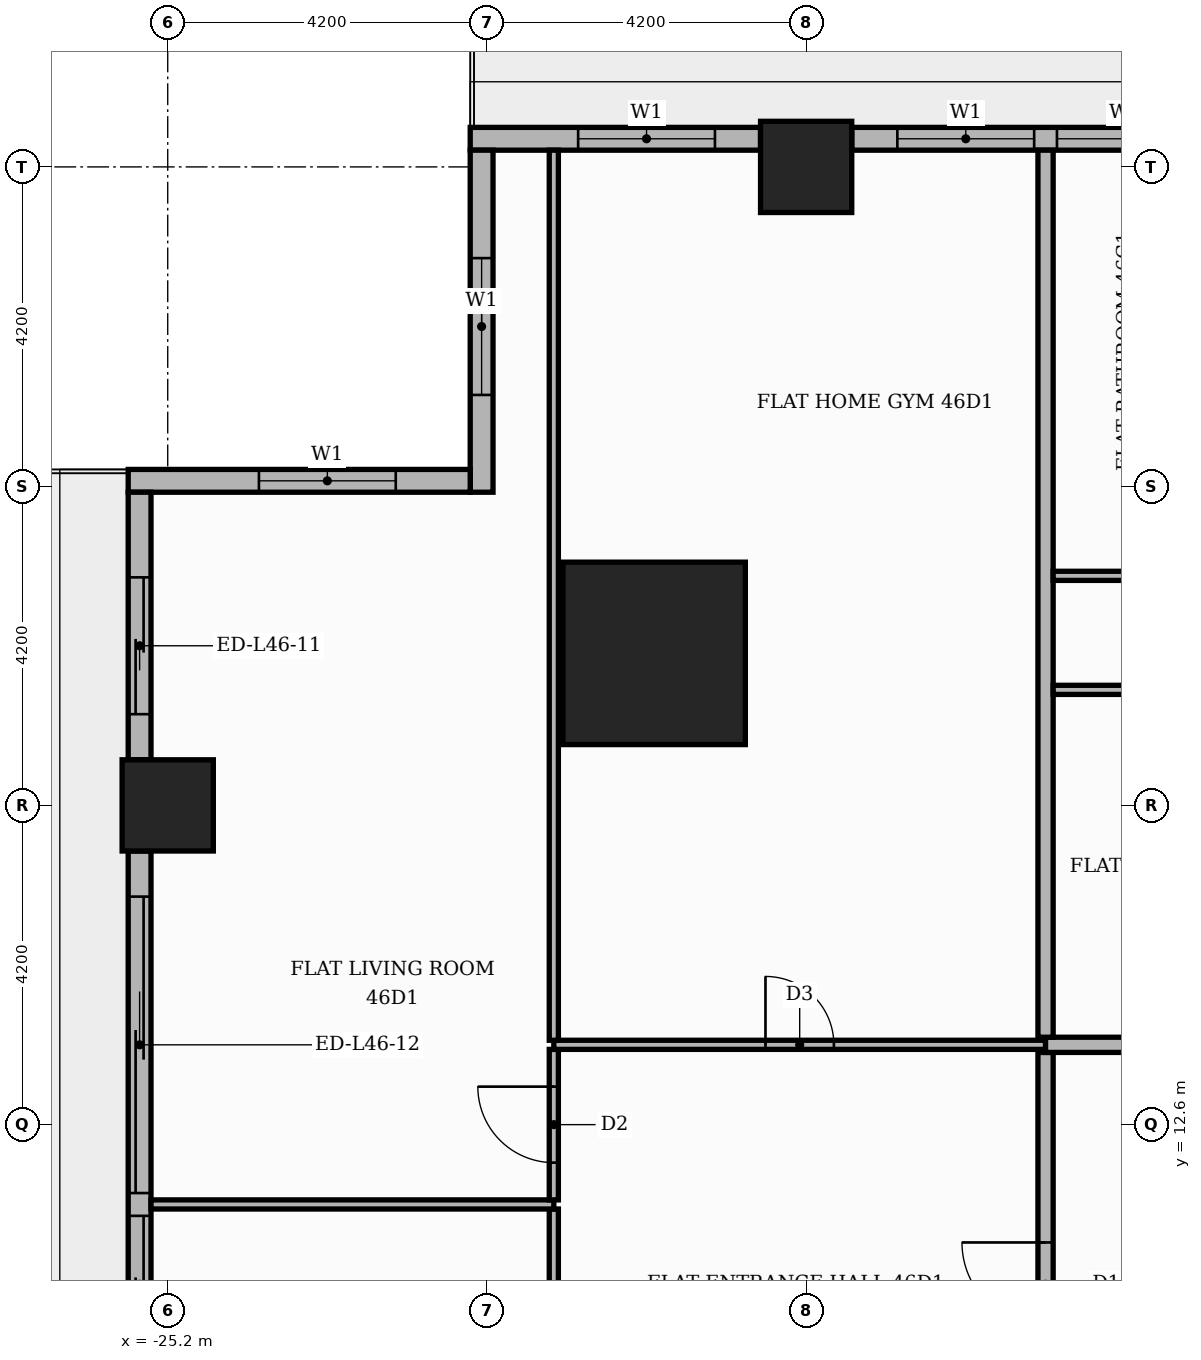
"""IFC4 building model, lengths in metres.
Left out: names, types, materials, properties, quantities, classifications, styles, units other than length and angle.
Written with IfcOpenShell. Run it as: python <this file> out.ifc"""

import sys

from ifc_helpers import new_model, si_unit, direction, frame, frame_2d, origin, origin_2d, place, context, subcontext, project, spatial, rectangle, extrude, element, fill, save


model = new_model("IFC4")
c1 = context("Model", 3, precision=1e-05, world=origin(), true_north=direction((0.0, 1.0)))
c2 = subcontext(c1, "Body", "Model", "MODEL_VIEW")
j1 = project(units=[si_unit("LENGTHUNIT", "METRE"), si_unit("PLANEANGLEUNIT", "RADIAN")], contexts=[c1])
p1 = place(None, origin())
s1 = spatial("IfcSite", under=j1, at=p1, CompositionType="ELEMENT")
p2 = place(p1, origin())
s2 = spatial("IfcBuilding", under=s1, at=p2, CompositionType="ELEMENT")
p3 = place(p2, frame((0.0, 0.0, 196.2)))
s3 = spatial("IfcBuildingStorey", under=s2, at=p3, CompositionType="ELEMENT", Elevation=196.2)
p4 = place(p3, frame((-18.8, 18.8, 0.0), z_axis=(0.0, 0.0, 1.0), x_axis=(1.0, 0.0, 0.0)))
e1 = element("IfcColumn", 1, at=p4, inside=s3, PredefinedType="COLUMN", context=c2, shape_type="SweptSolid", body=[
    extrude(rectangle(XDim=2.4, YDim=2.4, at=origin_2d()), origin(), (0.0, 0.0, 1.0), 3.9),
])
for number, where, z_axis, x_axis in (
    (2, (-16.8, 25.2, 0.0), (0.0, 0.0, 1.0), (1.0, 0.0, 0.0)),
    (3, (-25.2, 16.8, 0.0), (0.0, 0.0, 1.0), (1.0, 0.0, 0.0)),
):
    element("IfcColumn", number, at=place(p3, frame(where, z_axis=z_axis, x_axis=x_axis)), inside=s3, PredefinedType="COLUMN", context=c2, shape_type="SweptSolid", body=[
        extrude(rectangle(XDim=1.2, YDim=1.2, at=origin_2d()), origin(), (0.0, 0.0, 1.0), 3.9),
    ])
p5 = place(p3, frame((-9.0, 25.57, 0.0), z_axis=(0.0, 0.0, 1.0), x_axis=(-1.0, 0.0, 0.0)))
e4 = element("IfcWall", 4, at=p5, inside=s3, PredefinedType="STANDARD", context=c2, shape_type="SweptSolid", body=[
    extrude(rectangle(XDim=7.2, YDim=0.3, at=frame_2d((3.6, 0.0))), origin(), (0.0, 0.0, 1.0), 3.48),
])
p6 = place(p5, frame((0.6, 0.0, 0.9)))
e5 = element("IfcOpeningElement", 5, at=p6, cuts=e4, PredefinedType="OPENING", context=c2, shape_type="SweptSolid", body=[
    extrude(rectangle(XDim=1.8, YDim=2.1, at=frame_2d((0.9, 1.05))), frame((0.0, 0.16, 0.0), z_axis=(0.0, -1.0, 0.0), x_axis=(1.0, 0.0, 0.0)), (0.0, 0.0, 1.0), 0.32),
])
p7 = place(p5, frame((2.7, 0.0, 0.9)))
e6 = element("IfcOpeningElement", 6, at=p7, cuts=e4, PredefinedType="OPENING", context=c2, shape_type="SweptSolid", body=[
    extrude(rectangle(XDim=1.8, YDim=2.1, at=frame_2d((0.9, 1.05))), frame((0.0, 0.16, 0.0), z_axis=(0.0, -1.0, 0.0), x_axis=(1.0, 0.0, 0.0)), (0.0, 0.0, 1.0), 0.32),
])
p8 = place(p5, frame((4.8, 0.0, 0.9)))
e7 = element("IfcOpeningElement", 7, at=p8, cuts=e4, PredefinedType="OPENING", context=c2, shape_type="SweptSolid", body=[
    extrude(rectangle(XDim=1.8, YDim=2.1, at=frame_2d((0.9, 1.05))), frame((0.0, 0.16, 0.0), z_axis=(0.0, -1.0, 0.0), x_axis=(1.0, 0.0, 0.0)), (0.0, 0.0, 1.0), 0.32),
])
p9 = place(p3, frame((-17.4, 25.57, 0.0), z_axis=(0.0, 0.0, 1.0), x_axis=(-1.0, 0.0, 0.0)))
e8 = element("IfcWall", 8, at=p9, inside=s3, PredefinedType="STANDARD", context=c2, shape_type="SweptSolid", body=[
    extrude(rectangle(XDim=3.82, YDim=0.3, at=frame_2d((1.91, 0.0))), origin(), (0.0, 0.0, 1.0), 3.48),
])
p10 = place(p9, frame((0.6, 0.0, 0.9)))
e9 = element("IfcOpeningElement", 9, at=p10, cuts=e8, PredefinedType="OPENING", context=c2, shape_type="SweptSolid", body=[
    extrude(rectangle(XDim=1.8, YDim=2.1, at=frame_2d((0.9, 1.05))), frame((0.0, 0.16, 0.0), z_axis=(0.0, -1.0, 0.0), x_axis=(1.0, 0.0, 0.0)), (0.0, 0.0, 1.0), 0.32),
])
p11 = place(p3, frame((-21.07, 25.42, 0.0), z_axis=(0.0, 0.0, 1.0), x_axis=(0.0, -1.0, 0.0)))
e10 = element("IfcWall", 10, at=p11, inside=s3, PredefinedType="STANDARD", context=c2, shape_type="SweptSolid", body=[
    extrude(rectangle(XDim=4.5, YDim=0.3, at=frame_2d((2.25, 0.0))), origin(), (0.0, 0.0, 1.0), 3.48),
])
p12 = place(p11, frame((1.42, 0.0, 0.9)))
e11 = element("IfcOpeningElement", 11, at=p12, cuts=e10, PredefinedType="OPENING", context=c2, shape_type="SweptSolid", body=[
    extrude(rectangle(XDim=1.8, YDim=2.1, at=frame_2d((0.9, 1.05))), frame((0.0, 0.16, 0.0), z_axis=(0.0, -1.0, 0.0), x_axis=(1.0, 0.0, 0.0)), (0.0, 0.0, 1.0), 0.32),
])
p13 = place(p3, frame((-21.22, 21.07, 0.0), z_axis=(0.0, 0.0, 1.0), x_axis=(-1.0, 0.0, 0.0)))
e12 = element("IfcWall", 12, at=p13, inside=s3, PredefinedType="STANDARD", context=c2, shape_type="SweptSolid", body=[
    extrude(rectangle(XDim=4.5, YDim=0.3, at=frame_2d((2.25, 0.0))), origin(), (0.0, 0.0, 1.0), 3.48),
])
p14 = place(p13, frame((0.98, 0.0, 0.9)))
e13 = element("IfcOpeningElement", 13, at=p14, cuts=e12, PredefinedType="OPENING", context=c2, shape_type="SweptSolid", body=[
    extrude(rectangle(XDim=1.8, YDim=2.1, at=frame_2d((0.9, 1.05))), frame((0.0, 0.16, 0.0), z_axis=(0.0, -1.0, 0.0), x_axis=(1.0, 0.0, 0.0)), (0.0, 0.0, 1.0), 0.32),
])
p15 = place(p3, frame((-25.57, 20.92, 0.0), z_axis=(0.0, 0.0, 1.0), x_axis=(0.0, -1.0, 0.0)))
e14 = element("IfcWall", 14, at=p15, inside=s3, PredefinedType="STANDARD", context=c2, shape_type="SweptSolid", body=[
    extrude(rectangle(XDim=3.52, YDim=0.3, at=frame_2d((1.76, 0.0))), origin(), (0.0, 0.0, 1.0), 3.48),
])
p16 = place(p15, frame((1.12, 0.0, 0.0)))
e15 = element("IfcOpeningElement", 15, at=p16, cuts=e14, PredefinedType="OPENING", context=c2, shape_type="SweptSolid", body=[
    extrude(rectangle(XDim=1.8, YDim=2.4, at=frame_2d((0.9, 1.2))), frame((0.0, 0.16, 0.0), z_axis=(0.0, -1.0, 0.0), x_axis=(1.0, 0.0, 0.0)), (0.0, 0.0, 1.0), 0.32),
])
p17 = place(p3, frame((-25.57, 16.2, 0.0), z_axis=(0.0, 0.0, 1.0), x_axis=(0.0, -1.0, 0.0)))
e16 = element("IfcWall", 16, at=p17, inside=s3, PredefinedType="STANDARD", context=c2, shape_type="SweptSolid", body=[
    extrude(rectangle(XDim=7.2, YDim=0.3, at=frame_2d((3.6, 0.0))), origin(), (0.0, 0.0, 1.0), 3.48),
])
p18 = place(p17, frame((0.6, 0.0, 0.0)))
e17 = element("IfcOpeningElement", 17, at=p18, cuts=e16, PredefinedType="OPENING", context=c2, shape_type="SweptSolid", body=[
    extrude(rectangle(XDim=3.9, YDim=2.4, at=frame_2d((1.95, 1.2))), frame((0.0, 0.16, 0.0), z_axis=(0.0, -1.0, 0.0), x_axis=(1.0, 0.0, 0.0)), (0.0, 0.0, 1.0), 0.32),
])
p19 = place(p17, frame((4.8, 0.0, 0.0)))
e18 = element("IfcOpeningElement", 18, at=p19, cuts=e16, PredefinedType="OPENING", context=c2, shape_type="SweptSolid", body=[
    extrude(rectangle(XDim=1.8, YDim=2.4, at=frame_2d((0.9, 1.2))), frame((0.0, 0.16, 0.0), z_axis=(0.0, -1.0, 0.0), x_axis=(1.0, 0.0, 0.0)), (0.0, 0.0, 1.0), 0.32),
])
p20 = place(p3, frame((-13.65, -13.55, 0.0), z_axis=(0.0, 0.0, 1.0), x_axis=(0.0, 1.0, 0.0)))
e19 = element("IfcWall", 19, at=p20, inside=s3, PredefinedType="PARTITIONING", context=c2, shape_type="SweptSolid", body=[
    extrude(rectangle(XDim=27.1, YDim=0.2, at=frame_2d((13.55, 0.0))), origin(), (0.0, 0.0, 1.0), 3.48),
])
p21 = place(p20, frame((23.5, 0.0, 0.0)))
e20 = element("IfcOpeningElement", 20, at=p21, cuts=e19, PredefinedType="OPENING", context=c2, shape_type="SweptSolid", body=[
    extrude(rectangle(XDim=1.1, YDim=2.4, at=frame_2d((0.55, 1.2))), frame((0.0, 0.11, 0.0), z_axis=(0.0, -1.0, 0.0), x_axis=(1.0, 0.0, 0.0)), (0.0, 0.0, 1.0), 0.22),
])
p22 = place(p3, frame((-20.12, 5.31, 0.0), z_axis=(0.0, 0.0, 1.0), x_axis=(0.0, 1.0, 0.0)))
e21 = element("IfcWall", 21, at=p22, inside=s3, PredefinedType="PARTITIONING", context=c2, shape_type="SweptSolid", body=[
    extrude(rectangle(XDim=6.18, YDim=0.12, at=frame_2d((3.09, 0.0))), origin(), (0.0, 0.0, 1.0), 3.48),
])
p23 = place(p22, frame((2.59, 0.0, 0.0)))
e22 = element("IfcOpeningElement", 22, at=p23, cuts=e21, PredefinedType="OPENING", context=c2, shape_type="SweptSolid", body=[
    extrude(rectangle(XDim=1.0, YDim=2.1, at=frame_2d((0.5, 1.05))), frame((0.0, 0.07, 0.0), z_axis=(0.0, -1.0, 0.0), x_axis=(1.0, 0.0, 0.0)), (0.0, 0.0, 1.0), 0.14),
])
p24 = place(p3, frame((-25.42, 11.55, 0.0), z_axis=(0.0, 0.0, 1.0), x_axis=(1.0, 0.0, 0.0)))
e23 = element("IfcWall", 23, at=p24, inside=s3, PredefinedType="PARTITIONING", context=c2, shape_type="SweptSolid", body=[
    extrude(rectangle(XDim=5.3, YDim=0.12, at=frame_2d((2.65, 0.0))), origin(), (0.0, 0.0, 1.0), 3.48),
])
p25 = place(p3, frame((-20.12, 11.61, 0.0), z_axis=(0.0, 0.0, 1.0), x_axis=(0.0, 1.0, 0.0)))
e24 = element("IfcWall", 24, at=p25, inside=s3, PredefinedType="PARTITIONING", context=c2, shape_type="SweptSolid", body=[
    extrude(rectangle(XDim=1.98, YDim=0.12, at=frame_2d((0.99, 0.0))), origin(), (0.0, 0.0, 1.0), 3.48),
])
p26 = place(p25, frame((0.49, 0.0, 0.0)))
e25 = element("IfcOpeningElement", 25, at=p26, cuts=e24, PredefinedType="OPENING", context=c2, shape_type="SweptSolid", body=[
    extrude(rectangle(XDim=1.0, YDim=2.1, at=frame_2d((0.5, 1.05))), frame((0.0, 0.07, 0.0), z_axis=(0.0, -1.0, 0.0), x_axis=(1.0, 0.0, 0.0)), (0.0, 0.0, 1.0), 0.14),
])
p27 = place(p3, frame((-20.12, 13.65, 0.0), z_axis=(0.0, 0.0, 1.0), x_axis=(1.0, 0.0, 0.0)))
e26 = element("IfcWall", 26, at=p27, inside=s3, PredefinedType="PARTITIONING", context=c2, shape_type="SweptSolid", body=[
    extrude(rectangle(XDim=6.47, YDim=0.12, at=frame_2d((3.235, 0.0))), origin(), (0.0, 0.0, 1.0), 3.48),
])
p28 = place(p27, frame((2.785, 0.0, 0.0)))
e27 = element("IfcOpeningElement", 27, at=p28, cuts=e26, PredefinedType="OPENING", context=c2, shape_type="SweptSolid", body=[
    extrude(rectangle(XDim=0.9, YDim=2.1, at=frame_2d((0.45, 1.05))), frame((0.0, 0.07, 0.0), z_axis=(0.0, -1.0, 0.0), x_axis=(1.0, 0.0, 0.0)), (0.0, 0.0, 1.0), 0.14),
])
p29 = place(p3, frame((-13.65, 13.65, 0.0), z_axis=(0.0, 0.0, 1.0), x_axis=(1.0, 0.0, 0.0)))
e28 = element("IfcWall", 28, at=p29, inside=s3, PredefinedType="PARTITIONING", context=c2, shape_type="SweptSolid", body=[
    extrude(rectangle(XDim=39.07, YDim=0.2, at=frame_2d((19.535, 0.0))), origin(), (0.0, 0.0, 1.0), 3.48),
])
p30 = place(p29, frame((23.6, 0.0, 0.0)))
e29 = element("IfcOpeningElement", 29, at=p30, cuts=e28, PredefinedType="OPENING", context=c2, shape_type="SweptSolid", body=[
    extrude(rectangle(XDim=1.1, YDim=2.4, at=frame_2d((0.55, 1.2))), frame((0.0, 0.11, 0.0), z_axis=(0.0, -1.0, 0.0), x_axis=(1.0, 0.0, 0.0)), (0.0, 0.0, 1.0), 0.22),
])
p31 = place(p3, frame((-20.12, 13.71, 0.0), z_axis=(0.0, 0.0, 1.0), x_axis=(0.0, 1.0, 0.0)))
e30 = element("IfcWall", 30, at=p31, inside=s3, PredefinedType="PARTITIONING", context=c2, shape_type="SweptSolid", body=[
    extrude(rectangle(XDim=11.71, YDim=0.12, at=frame_2d((5.855, 0.0))), origin(), (0.0, 0.0, 1.0), 3.48),
])
p32 = place(p3, frame((-13.65, 13.75, 0.0), z_axis=(0.0, 0.0, 1.0), x_axis=(0.0, 1.0, 0.0)))
e31 = element("IfcWall", 31, at=p32, inside=s3, PredefinedType="PARTITIONING", context=c2, shape_type="SweptSolid", body=[
    extrude(rectangle(XDim=11.67, YDim=0.2, at=frame_2d((5.835, 0.0))), origin(), (0.0, 0.0, 1.0), 3.48),
])
p33 = place(p3, frame((-13.55, 18.32, 0.0), z_axis=(0.0, 0.0, 1.0), x_axis=(1.0, 0.0, 0.0)))
e32 = element("IfcWall", 32, at=p33, inside=s3, PredefinedType="PARTITIONING", context=c2, shape_type="SweptSolid", body=[
    extrude(rectangle(XDim=20.9, YDim=0.12, at=frame_2d((10.45, 0.0))), origin(), (0.0, 0.0, 1.0), 3.48),
])
p34 = place(p33, frame((17.225, 0.0, 0.0)))
e33 = element("IfcOpeningElement", 33, at=p34, cuts=e32, PredefinedType="OPENING", context=c2, shape_type="SweptSolid", body=[
    extrude(rectangle(XDim=0.9, YDim=2.1, at=frame_2d((0.45, 1.05))), frame((0.0, 0.07, 0.0), z_axis=(0.0, -1.0, 0.0), x_axis=(1.0, 0.0, 0.0)), (0.0, 0.0, 1.0), 0.14),
])
p35 = place(p33, frame((11.9, 0.0, 0.0)))
e34 = element("IfcOpeningElement", 34, at=p35, cuts=e32, PredefinedType="OPENING", context=c2, shape_type="SweptSolid", body=[
    extrude(rectangle(XDim=0.9, YDim=2.1, at=frame_2d((0.45, 1.05))), frame((0.0, 0.07, 0.0), z_axis=(0.0, -1.0, 0.0), x_axis=(1.0, 0.0, 0.0)), (0.0, 0.0, 1.0), 0.14),
])
p36 = place(p33, frame((8.825, 0.0, 0.0)))
e35 = element("IfcOpeningElement", 35, at=p36, cuts=e32, PredefinedType="OPENING", context=c2, shape_type="SweptSolid", body=[
    extrude(rectangle(XDim=0.9, YDim=2.1, at=frame_2d((0.45, 1.05))), frame((0.0, 0.07, 0.0), z_axis=(0.0, -1.0, 0.0), x_axis=(1.0, 0.0, 0.0)), (0.0, 0.0, 1.0), 0.14),
])
p37 = place(p33, frame((6.05, 0.0, 0.0)))
e36 = element("IfcOpeningElement", 36, at=p37, cuts=e32, PredefinedType="OPENING", context=c2, shape_type="SweptSolid", body=[
    extrude(rectangle(XDim=0.9, YDim=2.1, at=frame_2d((0.45, 1.05))), frame((0.0, 0.07, 0.0), z_axis=(0.0, -1.0, 0.0), x_axis=(1.0, 0.0, 0.0)), (0.0, 0.0, 1.0), 0.14),
])
p38 = place(p33, frame((1.85, 0.0, 0.0)))
e37 = element("IfcOpeningElement", 37, at=p38, cuts=e32, PredefinedType="OPENING", context=c2, shape_type="SweptSolid", body=[
    extrude(rectangle(XDim=0.9, YDim=2.1, at=frame_2d((0.45, 1.05))), frame((0.0, 0.07, 0.0), z_axis=(0.0, -1.0, 0.0), x_axis=(1.0, 0.0, 0.0)), (0.0, 0.0, 1.0), 0.14),
])
p39 = place(p3, frame((-13.55, 19.82, 0.0), z_axis=(0.0, 0.0, 1.0), x_axis=(1.0, 0.0, 0.0)))
e38 = element("IfcWall", 38, at=p39, inside=s3, PredefinedType="PARTITIONING", context=c2, shape_type="SweptSolid", body=[
    extrude(rectangle(XDim=31.15, YDim=0.12, at=frame_2d((15.575, 0.0))), origin(), (0.0, 0.0, 1.0), 3.48),
])
p40 = place(p39, frame((25.65, 0.0, 0.0)))
e39 = element("IfcOpeningElement", 39, at=p40, cuts=e38, PredefinedType="OPENING", context=c2, shape_type="SweptSolid", body=[
    extrude(rectangle(XDim=1.0, YDim=2.1, at=frame_2d((0.5, 1.05))), frame((0.0, 0.07, 0.0), z_axis=(0.0, -1.0, 0.0), x_axis=(1.0, 0.0, 0.0)), (0.0, 0.0, 1.0), 0.14),
])
p41 = place(p39, frame((22.55, 0.0, 0.0)))
e40 = element("IfcOpeningElement", 40, at=p41, cuts=e38, PredefinedType="OPENING", context=c2, shape_type="SweptSolid", body=[
    extrude(rectangle(XDim=0.9, YDim=2.1, at=frame_2d((0.45, 1.05))), frame((0.0, 0.07, 0.0), z_axis=(0.0, -1.0, 0.0), x_axis=(1.0, 0.0, 0.0)), (0.0, 0.0, 1.0), 0.14),
])
p42 = place(p39, frame((18.35, 0.0, 0.0)))
e41 = element("IfcOpeningElement", 41, at=p42, cuts=e38, PredefinedType="OPENING", context=c2, shape_type="SweptSolid", body=[
    extrude(rectangle(XDim=0.9, YDim=2.1, at=frame_2d((0.45, 1.05))), frame((0.0, 0.07, 0.0), z_axis=(0.0, -1.0, 0.0), x_axis=(1.0, 0.0, 0.0)), (0.0, 0.0, 1.0), 0.14),
])
p43 = place(p39, frame((9.95, 0.0, 0.0)))
e42 = element("IfcOpeningElement", 42, at=p43, cuts=e38, PredefinedType="OPENING", context=c2, shape_type="SweptSolid", body=[
    extrude(rectangle(XDim=0.9, YDim=2.1, at=frame_2d((0.45, 1.05))), frame((0.0, 0.07, 0.0), z_axis=(0.0, -1.0, 0.0), x_axis=(1.0, 0.0, 0.0)), (0.0, 0.0, 1.0), 0.14),
])
p44 = place(p39, frame((3.65, 0.0, 0.0)))
e43 = element("IfcOpeningElement", 43, at=p44, cuts=e38, PredefinedType="OPENING", context=c2, shape_type="SweptSolid", body=[
    extrude(rectangle(XDim=0.9, YDim=2.1, at=frame_2d((0.45, 1.05))), frame((0.0, 0.07, 0.0), z_axis=(0.0, -1.0, 0.0), x_axis=(1.0, 0.0, 0.0)), (0.0, 0.0, 1.0), 0.14),
])
p45 = place(p7, origin())
e44 = element("IfcWindow", 44, at=p45, inside=s3, PartitioningType="SINGLE_PANEL", PredefinedType="WINDOW", context=c2, shape_type="SweptSolid", body=[
    extrude(rectangle(XDim=1.8, YDim=2.1, at=frame_2d((0.9, 1.05))), frame((0.0, 0.03, 0.0), z_axis=(0.0, -1.0, 0.0), x_axis=(1.0, 0.0, 0.0)), (0.0, 0.0, 1.0), 0.06),
])
fill(e6, e44)
p46 = place(p8, origin())
e45 = element("IfcWindow", 45, at=p46, inside=s3, PartitioningType="SINGLE_PANEL", PredefinedType="WINDOW", context=c2, shape_type="SweptSolid", body=[
    extrude(rectangle(XDim=1.8, YDim=2.1, at=frame_2d((0.9, 1.05))), frame((0.0, 0.03, 0.0), z_axis=(0.0, -1.0, 0.0), x_axis=(1.0, 0.0, 0.0)), (0.0, 0.0, 1.0), 0.06),
])
fill(e7, e45)
p47 = place(p10, origin())
e46 = element("IfcWindow", 46, at=p47, inside=s3, PartitioningType="SINGLE_PANEL", PredefinedType="WINDOW", context=c2, shape_type="SweptSolid", body=[
    extrude(rectangle(XDim=1.8, YDim=2.1, at=frame_2d((0.9, 1.05))), frame((0.0, 0.03, 0.0), z_axis=(0.0, -1.0, 0.0), x_axis=(1.0, 0.0, 0.0)), (0.0, 0.0, 1.0), 0.06),
])
fill(e9, e46)
p48 = place(p12, origin())
e47 = element("IfcWindow", 47, at=p48, inside=s3, PartitioningType="SINGLE_PANEL", PredefinedType="WINDOW", context=c2, shape_type="SweptSolid", body=[
    extrude(rectangle(XDim=1.8, YDim=2.1, at=frame_2d((0.9, 1.05))), frame((0.0, 0.03, 0.0), z_axis=(0.0, -1.0, 0.0), x_axis=(1.0, 0.0, 0.0)), (0.0, 0.0, 1.0), 0.06),
])
fill(e11, e47)
p49 = place(p14, origin())
e48 = element("IfcWindow", 48, at=p49, inside=s3, PartitioningType="SINGLE_PANEL", PredefinedType="WINDOW", context=c2, shape_type="SweptSolid", body=[
    extrude(rectangle(XDim=1.8, YDim=2.1, at=frame_2d((0.9, 1.05))), frame((0.0, 0.03, 0.0), z_axis=(0.0, -1.0, 0.0), x_axis=(1.0, 0.0, 0.0)), (0.0, 0.0, 1.0), 0.06),
])
fill(e13, e48)
p50 = place(p16, origin())
e49 = element("IfcDoor", 49, at=p50, inside=s3, OperationType="SLIDING_TO_RIGHT", PredefinedType="DOOR", context=c2, shape_type="SweptSolid", body=[
    extrude(rectangle(XDim=1.8, YDim=2.4, at=frame_2d((0.9, 1.2))), frame((0.0, 0.025, 0.0), z_axis=(0.0, -1.0, 0.0), x_axis=(1.0, 0.0, 0.0)), (0.0, 0.0, 1.0), 0.05),
])
fill(e15, e49)
p51 = place(p18, origin())
e50 = element("IfcDoor", 50, at=p51, inside=s3, OperationType="SLIDING_TO_LEFT", PredefinedType="DOOR", context=c2, shape_type="SweptSolid", body=[
    extrude(rectangle(XDim=3.9, YDim=2.4, at=frame_2d((1.95, 1.2))), frame((0.0, 0.025, 0.0), z_axis=(0.0, -1.0, 0.0), x_axis=(1.0, 0.0, 0.0)), (0.0, 0.0, 1.0), 0.05),
])
fill(e17, e50)
p52 = place(p19, origin())
e51 = element("IfcDoor", 51, at=p52, inside=s3, OperationType="SLIDING_TO_RIGHT", PredefinedType="DOOR", context=c2, shape_type="SweptSolid", body=[
    extrude(rectangle(XDim=1.8, YDim=2.4, at=frame_2d((0.9, 1.2))), frame((0.0, 0.025, 0.0), z_axis=(0.0, -1.0, 0.0), x_axis=(1.0, 0.0, 0.0)), (0.0, 0.0, 1.0), 0.05),
])
fill(e18, e51)
p53 = place(p21, origin())
e52 = element("IfcDoor", 52, at=p53, inside=s3, OperationType="SINGLE_SWING_RIGHT", PredefinedType="DOOR", context=c2, shape_type="SweptSolid", body=[
    extrude(rectangle(XDim=1.1, YDim=2.4, at=frame_2d((0.55, 1.2))), frame((0.0, 0.025, 0.0), z_axis=(0.0, -1.0, 0.0), x_axis=(1.0, 0.0, 0.0)), (0.0, 0.0, 1.0), 0.05),
])
fill(e20, e52)
p54 = place(p28, origin())
e53 = element("IfcDoor", 53, at=p54, inside=s3, OperationType="SINGLE_SWING_LEFT", PredefinedType="DOOR", context=c2, shape_type="SweptSolid", body=[
    extrude(rectangle(XDim=0.9, YDim=2.1, at=frame_2d((0.45, 1.05))), frame((0.0, 0.025, 0.0), z_axis=(0.0, -1.0, 0.0), x_axis=(1.0, 0.0, 0.0)), (0.0, 0.0, 1.0), 0.05),
])
fill(e27, e53)
p55 = place(p26, origin())
e54 = element("IfcDoor", 54, at=p55, inside=s3, OperationType="SINGLE_SWING_RIGHT", PredefinedType="DOOR", context=c2, shape_type="SweptSolid", body=[
    extrude(rectangle(XDim=1.0, YDim=2.1, at=frame_2d((0.5, 1.05))), frame((0.0, 0.025, 0.0), z_axis=(0.0, -1.0, 0.0), x_axis=(1.0, 0.0, 0.0)), (0.0, 0.0, 1.0), 0.05),
])
fill(e25, e54)
save(model, sys.argv[1])
